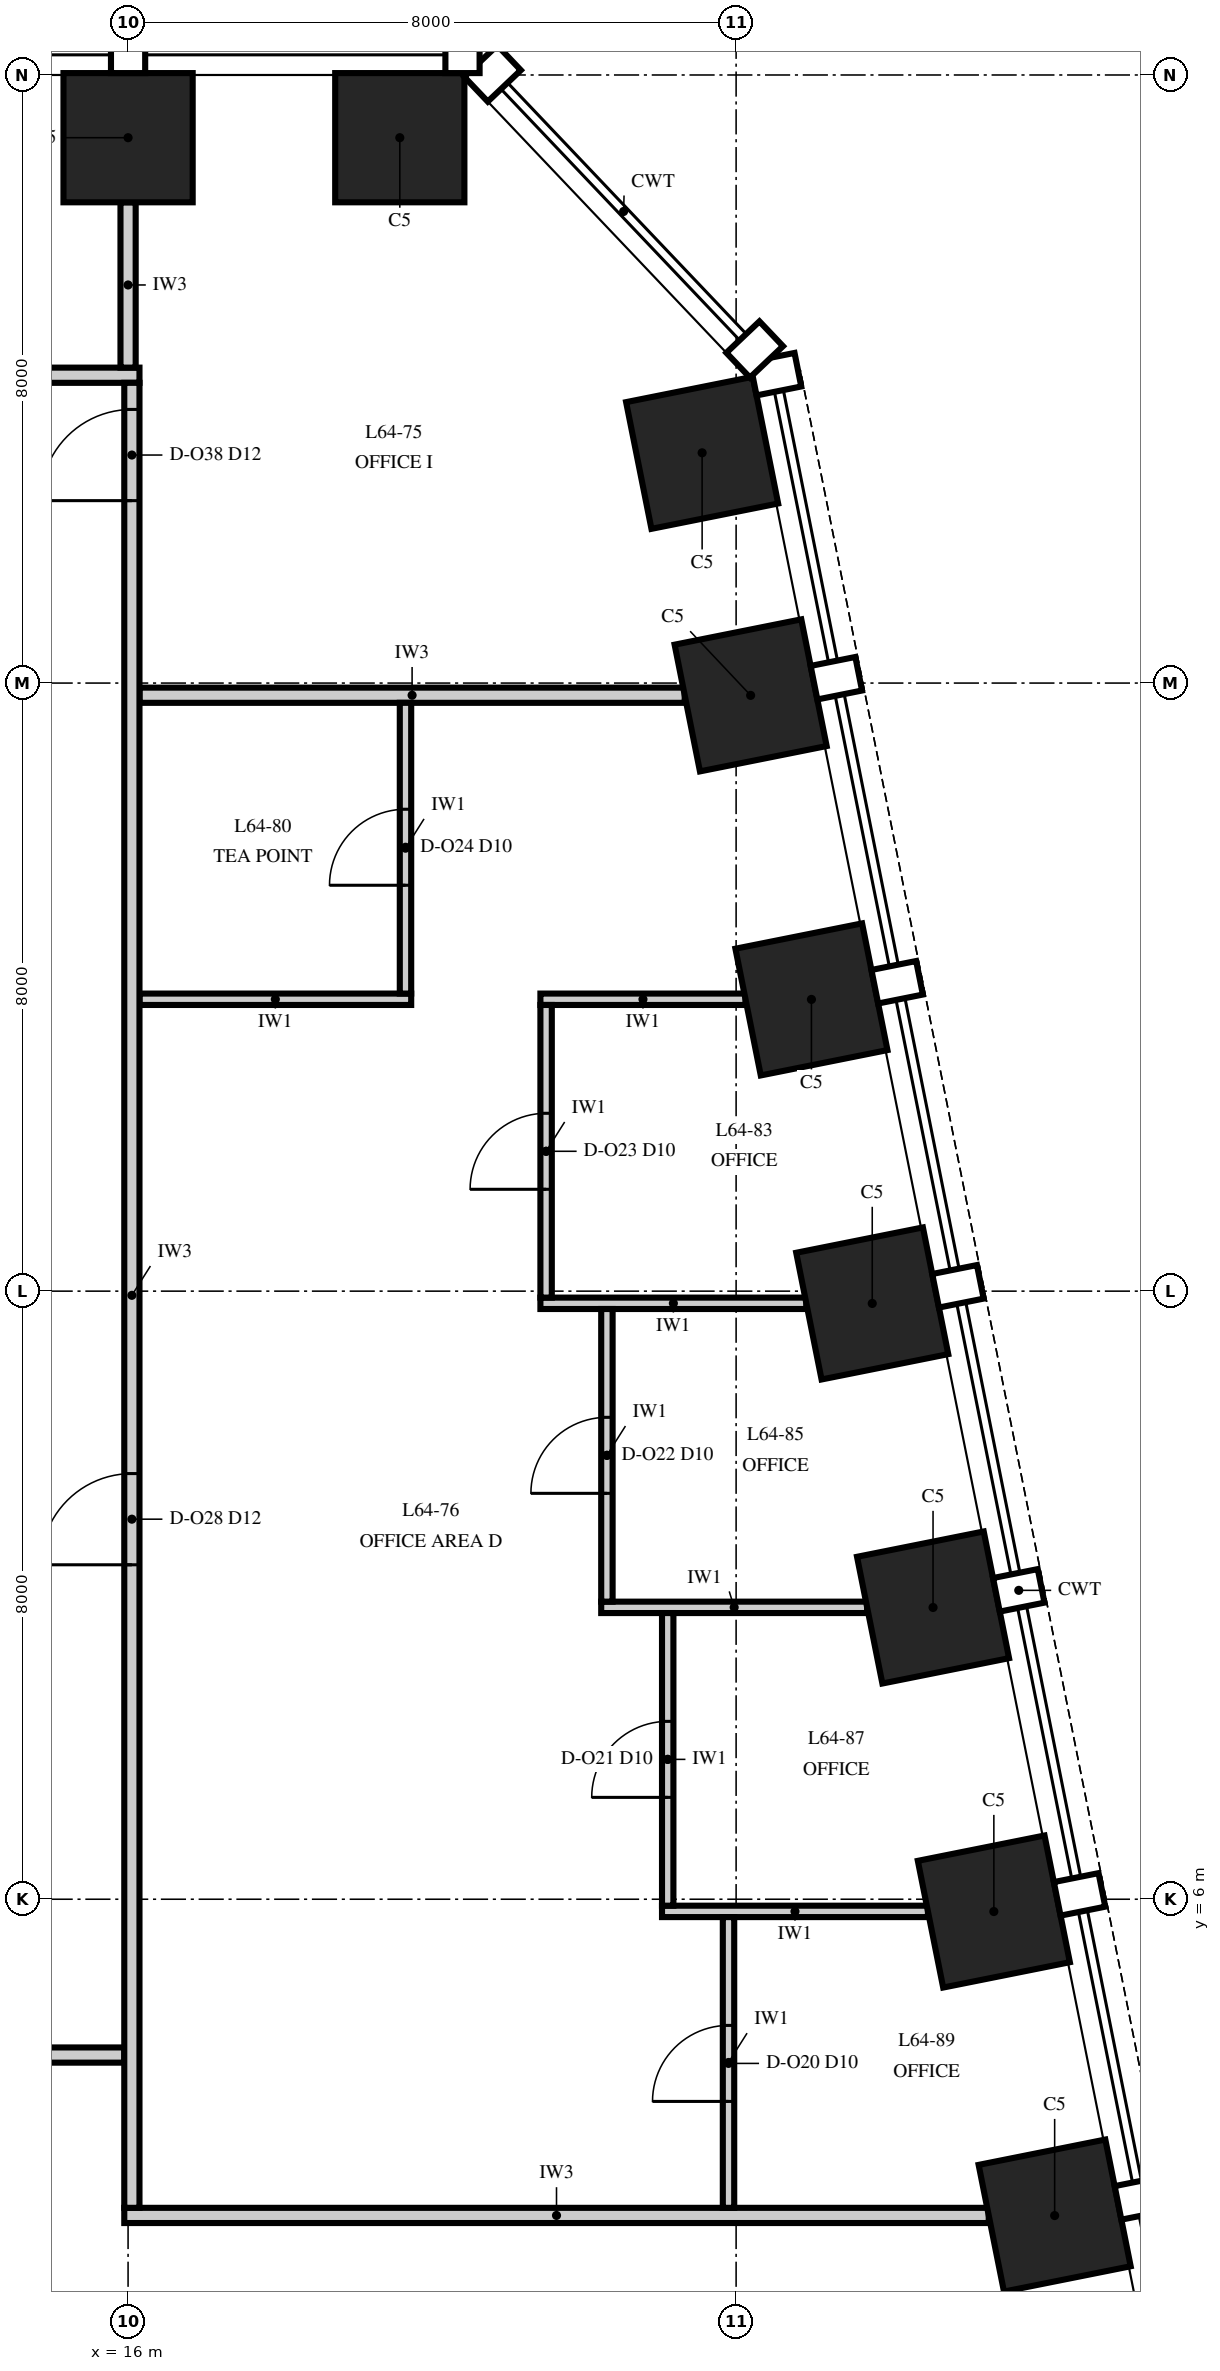
"""IFC4 building model, lengths in metres.
Left out: names, types, materials, properties, quantities, classifications, styles, units other than length and angle.
Written with IfcOpenShell. Run it as: python <this file> out.ifc"""

import sys

from ifc_helpers import new_model, si_unit, direction, frame, frame_2d, origin, origin_2d, place, context, subcontext, project, spatial, rectangle, extrude, element, fill, save


model = new_model("IFC4")
c1 = context("Model", 3, precision=1e-05, world=origin(), true_north=direction((0.0, 1.0)))
c2 = subcontext(c1, "Body", "Model", "MODEL_VIEW")
j1 = project(units=[si_unit("LENGTHUNIT", "METRE"), si_unit("PLANEANGLEUNIT", "RADIAN")], contexts=[c1])
p1 = place(None, origin())
s1 = spatial("IfcSite", under=j1, at=p1, CompositionType="ELEMENT")
p2 = place(p1, origin())
s2 = spatial("IfcBuilding", under=s1, at=p2, CompositionType="ELEMENT")
p3 = place(p2, frame((0.0, 0.0, 276.0)))
s3 = spatial("IfcBuildingStorey", under=s2, at=p3, CompositionType="ELEMENT", Elevation=276.0)
for number, where, z_axis, x_axis in (
    (1, (28.191, 1.838, 0.0), (0.0, 0.0, 1.0), (-0.196, 0.981, 0.0)),
    (2, (27.391, 5.838, 0.0), (0.0, 0.0, 1.0), (-0.196, 0.981, 0.0)),
    (3, (26.591, 9.838, 0.0), (0.0, 0.0, 1.0), (-0.196, 0.981, 0.0)),
    (4, (25.791, 13.838, 0.0), (0.0, 0.0, 1.0), (-0.196, 0.981, 0.0)),
    (5, (24.991, 17.838, 0.0), (0.0, 0.0, 1.0), (-0.196, 0.981, 0.0)),
    (6, (24.191, 21.838, 0.0), (0.0, 0.0, 1.0), (-0.196, 0.981, 0.0)),
    (7, (23.553, 25.029, 0.0), (0.0, 0.0, 1.0), (-0.196, 0.981, 0.0)),
    (8, (19.575, 29.175, 0.0), (0.0, 0.0, 1.0), (-1.0, 0.0, 0.0)),
    (9, (16.0, 29.175, 0.0), (0.0, 0.0, 1.0), (-1.0, 0.0, 0.0)),
):
    element("IfcColumn", number, at=place(p3, frame(where, z_axis=z_axis, x_axis=x_axis)), inside=s3, PredefinedType="COLUMN", context=c2, shape_type="SweptSolid", body=[
        extrude(rectangle(XDim=1.7, YDim=1.7, at=origin_2d()), origin(), (0.0, 0.0, 1.0), 4.0),
    ])
p4 = place(p3, frame((15.95, 1.84, 0.0), z_axis=(0.0, 0.0, 1.0), x_axis=(1.0, 0.0, 0.0)))
e10 = element("IfcWall", 10, at=p4, inside=s3, PredefinedType="PARTITIONING", context=c2, shape_type="SweptSolid", body=[
    extrude(rectangle(XDim=11.374, YDim=0.2, at=frame_2d((5.687, 0.0))), origin(), (0.0, 0.0, 1.0), 3.23),
])
p5 = place(p3, frame((-15.95, 3.95, 0.0), z_axis=(0.0, 0.0, 1.0), x_axis=(1.0, 0.0, 0.0)))
e11 = element("IfcWall", 11, at=p5, inside=s3, PredefinedType="PARTITIONING", context=c2, shape_type="SweptSolid", body=[
    extrude(rectangle(XDim=31.9, YDim=0.2, at=frame_2d((15.95, 0.0))), origin(), (0.0, 0.0, 1.0), 3.23),
])
p6 = place(p5, frame((7.35, 0.0, 0.0)))
e12 = element("IfcOpeningElement", 12, at=p6, cuts=e11, PredefinedType="OPENING", context=c2, shape_type="SweptSolid", body=[
    extrude(rectangle(XDim=1.2, YDim=2.4, at=frame_2d((0.6, 1.2))), frame((0.0, 0.115, 0.0), z_axis=(0.0, -1.0, 0.0), x_axis=(1.0, 0.0, 0.0)), (0.0, 0.0, 1.0), 0.23),
])
p7 = place(p5, frame((23.35, 0.0, 0.0)))
e13 = element("IfcOpeningElement", 13, at=p7, cuts=e11, PredefinedType="OPENING", context=c2, shape_type="SweptSolid", body=[
    extrude(rectangle(XDim=1.2, YDim=2.4, at=frame_2d((0.6, 1.2))), frame((0.0, 0.115, 0.0), z_axis=(0.0, -1.0, 0.0), x_axis=(1.0, 0.0, 0.0)), (0.0, 0.0, 1.0), 0.23),
])
p8 = place(p3, frame((23.025, 5.84, 0.0), z_axis=(0.0, 0.0, 1.0), x_axis=(1.0, 0.0, 0.0)))
e14 = element("IfcWall", 14, at=p8, inside=s3, PredefinedType="PARTITIONING", context=c2, shape_type="SweptSolid", body=[
    extrude(rectangle(XDim=3.499, YDim=0.15, at=frame_2d((1.75, 0.0))), origin(), (0.0, 0.0, 1.0), 2.842),
])
for number, where, z_axis, x_axis in (
    (15, (22.225, 9.84, 0.0), (0.0, 0.0, 1.0), (1.0, 0.0, 0.0)),
    (16, (21.425, 13.84, 0.0), (0.0, 0.0, 1.0), (1.0, 0.0, 0.0)),
):
    element("IfcWall", number, at=place(p3, frame(where, z_axis=z_axis, x_axis=x_axis)), inside=s3, PredefinedType="PARTITIONING", context=c2, shape_type="SweptSolid", body=[
        extrude(rectangle(XDim=3.499, YDim=0.15, at=frame_2d((1.75, 0.0))), origin(), (0.0, 0.0, 1.0), 3.23),
    ])
p9 = place(p3, frame((16.15, 17.84, 0.0), z_axis=(0.0, 0.0, 1.0), x_axis=(1.0, 0.0, 0.0)))
e17 = element("IfcWall", 17, at=p9, inside=s3, PredefinedType="PARTITIONING", context=c2, shape_type="SweptSolid", body=[
    extrude(rectangle(XDim=3.575, YDim=0.15, at=frame_2d((1.788, 0.0))), origin(), (0.0, 0.0, 1.0), 3.23),
])
p10 = place(p3, frame((21.425, 17.84, 0.0), z_axis=(0.0, 0.0, 1.0), x_axis=(1.0, 0.0, 0.0)))
e18 = element("IfcWall", 18, at=p10, inside=s3, PredefinedType="PARTITIONING", context=c2, shape_type="SweptSolid", body=[
    extrude(rectangle(XDim=2.699, YDim=0.15, at=frame_2d((1.349, 0.0))), origin(), (0.0, 0.0, 1.0), 3.23),
])
p11 = place(p3, frame((16.15, 21.84, 0.0), z_axis=(0.0, 0.0, 1.0), x_axis=(1.0, 0.0, 0.0)))
e19 = element("IfcWall", 19, at=p11, inside=s3, PredefinedType="PARTITIONING", context=c2, shape_type="SweptSolid", body=[
    extrude(rectangle(XDim=7.174, YDim=0.2, at=frame_2d((3.587, 0.0))), origin(), (0.0, 0.0, 1.0), 3.23),
])
p12 = place(p3, frame((-16.15, 26.05, 0.0), z_axis=(0.0, 0.0, 1.0), x_axis=(1.0, 0.0, 0.0)))
e20 = element("IfcWall", 20, at=p12, inside=s3, PredefinedType="PARTITIONING", context=c2, shape_type="SweptSolid", body=[
    extrude(rectangle(XDim=32.3, YDim=0.2, at=frame_2d((16.15, 0.0))), origin(), (0.0, 0.0, 1.0), 3.418),
])
p13 = place(p12, frame((1.55, 0.0, 0.0)))
e21 = element("IfcOpeningElement", 21, at=p13, cuts=e20, PredefinedType="OPENING", context=c2, shape_type="SweptSolid", body=[
    extrude(rectangle(XDim=1.2, YDim=2.4, at=frame_2d((0.6, 1.2))), frame((0.0, 0.115, 0.0), z_axis=(0.0, -1.0, 0.0), x_axis=(1.0, 0.0, 0.0)), (0.0, 0.0, 1.0), 0.23),
])
p14 = place(p12, frame((5.55, 0.0, 0.0)))
e22 = element("IfcOpeningElement", 22, at=p14, cuts=e20, PredefinedType="OPENING", context=c2, shape_type="SweptSolid", body=[
    extrude(rectangle(XDim=1.2, YDim=2.4, at=frame_2d((0.6, 1.2))), frame((0.0, 0.115, 0.0), z_axis=(0.0, -1.0, 0.0), x_axis=(1.0, 0.0, 0.0)), (0.0, 0.0, 1.0), 0.23),
])
p15 = place(p12, frame((9.55, 0.0, 0.0)))
e23 = element("IfcOpeningElement", 23, at=p15, cuts=e20, PredefinedType="OPENING", context=c2, shape_type="SweptSolid", body=[
    extrude(rectangle(XDim=1.2, YDim=2.4, at=frame_2d((0.6, 1.2))), frame((0.0, 0.115, 0.0), z_axis=(0.0, -1.0, 0.0), x_axis=(1.0, 0.0, 0.0)), (0.0, 0.0, 1.0), 0.23),
])
p16 = place(p12, frame((13.55, 0.0, 0.0)))
e24 = element("IfcOpeningElement", 24, at=p16, cuts=e20, PredefinedType="OPENING", context=c2, shape_type="SweptSolid", body=[
    extrude(rectangle(XDim=1.2, YDim=2.4, at=frame_2d((0.6, 1.2))), frame((0.0, 0.115, 0.0), z_axis=(0.0, -1.0, 0.0), x_axis=(1.0, 0.0, 0.0)), (0.0, 0.0, 1.0), 0.23),
])
p17 = place(p12, frame((17.55, 0.0, 0.0)))
e25 = element("IfcOpeningElement", 25, at=p17, cuts=e20, PredefinedType="OPENING", context=c2, shape_type="SweptSolid", body=[
    extrude(rectangle(XDim=1.2, YDim=2.4, at=frame_2d((0.6, 1.2))), frame((0.0, 0.115, 0.0), z_axis=(0.0, -1.0, 0.0), x_axis=(1.0, 0.0, 0.0)), (0.0, 0.0, 1.0), 0.23),
])
p18 = place(p12, frame((21.55, 0.0, 0.0)))
e26 = element("IfcOpeningElement", 26, at=p18, cuts=e20, PredefinedType="OPENING", context=c2, shape_type="SweptSolid", body=[
    extrude(rectangle(XDim=1.2, YDim=2.4, at=frame_2d((0.6, 1.2))), frame((0.0, 0.115, 0.0), z_axis=(0.0, -1.0, 0.0), x_axis=(1.0, 0.0, 0.0)), (0.0, 0.0, 1.0), 0.23),
])
p19 = place(p12, frame((25.55, 0.0, 0.0)))
e27 = element("IfcOpeningElement", 27, at=p19, cuts=e20, PredefinedType="OPENING", context=c2, shape_type="SweptSolid", body=[
    extrude(rectangle(XDim=1.2, YDim=2.4, at=frame_2d((0.6, 1.2))), frame((0.0, 0.115, 0.0), z_axis=(0.0, -1.0, 0.0), x_axis=(1.0, 0.0, 0.0)), (0.0, 0.0, 1.0), 0.23),
])
p20 = place(p12, frame((29.55, 0.0, 0.0)))
e28 = element("IfcOpeningElement", 28, at=p20, cuts=e20, PredefinedType="OPENING", context=c2, shape_type="SweptSolid", body=[
    extrude(rectangle(XDim=1.2, YDim=2.4, at=frame_2d((0.6, 1.2))), frame((0.0, 0.115, 0.0), z_axis=(0.0, -1.0, 0.0), x_axis=(1.0, 0.0, 0.0)), (0.0, 0.0, 1.0), 0.23),
])
p21 = place(p3, frame((16.0, 26.15, 0.0), z_axis=(0.0, 0.0, 1.0), x_axis=(0.0, 1.0, 0.0)))
e29 = element("IfcWall", 29, at=p21, inside=s3, PredefinedType="PARTITIONING", context=c2, shape_type="SweptSolid", body=[
    extrude(rectangle(XDim=2.175, YDim=0.2, at=frame_2d((1.087, 0.0))), origin(), (0.0, 0.0, 1.0), 3.418),
])
p22 = place(p3, frame((16.05, 1.94, 0.0), z_axis=(0.0, 0.0, 1.0), x_axis=(0.0, 1.0, 0.0)))
e30 = element("IfcWall", 30, at=p22, inside=s3, PredefinedType="PARTITIONING", context=c2, shape_type="SweptSolid", body=[
    extrude(rectangle(XDim=24.01, YDim=0.2, at=frame_2d((12.005, 0.0))), origin(), (0.0, 0.0, 1.0), 2.842),
])
p23 = place(p22, frame((8.46, 0.0, 0.0)))
e31 = element("IfcOpeningElement", 31, at=p23, cuts=e30, PredefinedType="OPENING", context=c2, shape_type="SweptSolid", body=[
    extrude(rectangle(XDim=1.2, YDim=2.4, at=frame_2d((0.6, 1.2))), frame((0.0, 0.115, 0.0), z_axis=(0.0, -1.0, 0.0), x_axis=(1.0, 0.0, 0.0)), (0.0, 0.0, 1.0), 0.23),
])
p24 = place(p22, frame((22.46, 0.0, 0.0)))
e32 = element("IfcOpeningElement", 32, at=p24, cuts=e30, PredefinedType="OPENING", context=c2, shape_type="SweptSolid", body=[
    extrude(rectangle(XDim=1.2, YDim=2.4, at=frame_2d((0.6, 1.2))), frame((0.0, 0.115, 0.0), z_axis=(0.0, -1.0, 0.0), x_axis=(1.0, 0.0, 0.0)), (0.0, 0.0, 1.0), 0.23),
])
p25 = place(p3, frame((19.65, 17.915, 0.0), z_axis=(0.0, 0.0, 1.0), x_axis=(0.0, 1.0, 0.0)))
e33 = element("IfcWall", 33, at=p25, inside=s3, PredefinedType="PARTITIONING", context=c2, shape_type="SweptSolid", body=[
    extrude(rectangle(XDim=3.825, YDim=0.15, at=frame_2d((1.913, 0.0))), origin(), (0.0, 0.0, 1.0), 3.23),
])
p26 = place(p25, frame((1.425, 0.0, 0.0)))
e34 = element("IfcOpeningElement", 34, at=p26, cuts=e33, PredefinedType="OPENING", context=c2, shape_type="SweptSolid", body=[
    extrude(rectangle(XDim=1.0, YDim=2.3, at=frame_2d((0.5, 1.15))), frame((0.0, 0.09, 0.0), z_axis=(0.0, -1.0, 0.0), x_axis=(1.0, 0.0, 0.0)), (0.0, 0.0, 1.0), 0.18),
])
p27 = place(p3, frame((21.5, 13.915, 0.0), z_axis=(0.0, 0.0, 1.0), x_axis=(0.0, 1.0, 0.0)))
e35 = element("IfcWall", 35, at=p27, inside=s3, PredefinedType="PARTITIONING", context=c2, shape_type="SweptSolid", body=[
    extrude(rectangle(XDim=3.85, YDim=0.15, at=frame_2d((1.925, 0.0))), origin(), (0.0, 0.0, 1.0), 3.23),
])
p28 = place(p27, frame((1.425, 0.0, 0.0)))
e36 = element("IfcOpeningElement", 36, at=p28, cuts=e35, PredefinedType="OPENING", context=c2, shape_type="SweptSolid", body=[
    extrude(rectangle(XDim=1.0, YDim=2.3, at=frame_2d((0.5, 1.15))), frame((0.0, 0.09, 0.0), z_axis=(0.0, -1.0, 0.0), x_axis=(1.0, 0.0, 0.0)), (0.0, 0.0, 1.0), 0.18),
])
p29 = place(p3, frame((22.3, 9.915, 0.0), z_axis=(0.0, 0.0, 1.0), x_axis=(0.0, 1.0, 0.0)))
e37 = element("IfcWall", 37, at=p29, inside=s3, PredefinedType="PARTITIONING", context=c2, shape_type="SweptSolid", body=[
    extrude(rectangle(XDim=3.85, YDim=0.15, at=frame_2d((1.925, 0.0))), origin(), (0.0, 0.0, 1.0), 3.85),
])
p30 = place(p29, frame((1.425, 0.0, 0.0)))
e38 = element("IfcOpeningElement", 38, at=p30, cuts=e37, PredefinedType="OPENING", context=c2, shape_type="SweptSolid", body=[
    extrude(rectangle(XDim=1.0, YDim=2.3, at=frame_2d((0.5, 1.15))), frame((0.0, 0.09, 0.0), z_axis=(0.0, -1.0, 0.0), x_axis=(1.0, 0.0, 0.0)), (0.0, 0.0, 1.0), 0.18),
])
p31 = place(p3, frame((23.1, 5.915, 0.0), z_axis=(0.0, 0.0, 1.0), x_axis=(0.0, 1.0, 0.0)))
e39 = element("IfcWall", 39, at=p31, inside=s3, PredefinedType="PARTITIONING", context=c2, shape_type="SweptSolid", body=[
    extrude(rectangle(XDim=3.85, YDim=0.15, at=frame_2d((1.925, 0.0))), origin(), (0.0, 0.0, 1.0), 2.842),
])
p32 = place(p31, frame((1.425, 0.0, 0.0)))
e40 = element("IfcOpeningElement", 40, at=p32, cuts=e39, PredefinedType="OPENING", context=c2, shape_type="SweptSolid", body=[
    extrude(rectangle(XDim=1.0, YDim=2.3, at=frame_2d((0.5, 1.15))), frame((0.0, 0.09, 0.0), z_axis=(0.0, -1.0, 0.0), x_axis=(1.0, 0.0, 0.0)), (0.0, 0.0, 1.0), 0.18),
])
p33 = place(p3, frame((23.9, 1.94, 0.0), z_axis=(0.0, 0.0, 1.0), x_axis=(0.0, 1.0, 0.0)))
e41 = element("IfcWall", 41, at=p33, inside=s3, PredefinedType="PARTITIONING", context=c2, shape_type="SweptSolid", body=[
    extrude(rectangle(XDim=3.825, YDim=0.15, at=frame_2d((1.913, 0.0))), origin(), (0.0, 0.0, 1.0), 3.85),
])
p34 = place(p33, frame((1.4, 0.0, 0.0)))
e42 = element("IfcOpeningElement", 42, at=p34, cuts=e41, PredefinedType="OPENING", context=c2, shape_type="SweptSolid", body=[
    extrude(rectangle(XDim=1.0, YDim=2.3, at=frame_2d((0.5, 1.15))), frame((0.0, 0.09, 0.0), z_axis=(0.0, -1.0, 0.0), x_axis=(1.0, 0.0, 0.0)), (0.0, 0.0, 1.0), 0.18),
])
p35 = place(p34, origin())
e43 = element("IfcDoor", 43, at=p35, inside=s3, OperationType="SINGLE_SWING_LEFT", PredefinedType="DOOR", context=c2, shape_type="SweptSolid", body=[
    extrude(rectangle(XDim=1.0, YDim=2.3, at=frame_2d((0.5, 1.15))), frame((0.0, 0.075, 0.0), z_axis=(0.0, -1.0, 0.0), x_axis=(1.0, 0.0, 0.0)), (0.0, 0.0, 1.0), 0.149),
])
fill(e42, e43)
p36 = place(p32, origin())
e44 = element("IfcDoor", 44, at=p36, inside=s3, OperationType="SINGLE_SWING_LEFT", PredefinedType="DOOR", context=c2, shape_type="SweptSolid", body=[
    extrude(rectangle(XDim=1.0, YDim=2.3, at=frame_2d((0.5, 1.15))), frame((0.0, 0.075, 0.0), z_axis=(0.0, -1.0, 0.0), x_axis=(1.0, 0.0, 0.0)), (0.0, 0.0, 1.0), 0.149),
])
fill(e40, e44)
p37 = place(p30, origin())
e45 = element("IfcDoor", 45, at=p37, inside=s3, OperationType="SINGLE_SWING_LEFT", PredefinedType="DOOR", context=c2, shape_type="SweptSolid", body=[
    extrude(rectangle(XDim=1.0, YDim=2.3, at=frame_2d((0.5, 1.15))), frame((0.0, 0.075, 0.0), z_axis=(0.0, -1.0, 0.0), x_axis=(1.0, 0.0, 0.0)), (0.0, 0.0, 1.0), 0.149),
])
fill(e38, e45)
p38 = place(p28, origin())
e46 = element("IfcDoor", 46, at=p38, inside=s3, OperationType="SINGLE_SWING_LEFT", PredefinedType="DOOR", context=c2, shape_type="SweptSolid", body=[
    extrude(rectangle(XDim=1.0, YDim=2.3, at=frame_2d((0.5, 1.15))), frame((0.0, 0.075, 0.0), z_axis=(0.0, -1.0, 0.0), x_axis=(1.0, 0.0, 0.0)), (0.0, 0.0, 1.0), 0.149),
])
fill(e36, e46)
p39 = place(p26, origin())
e47 = element("IfcDoor", 47, at=p39, inside=s3, OperationType="SINGLE_SWING_LEFT", PredefinedType="DOOR", context=c2, shape_type="SweptSolid", body=[
    extrude(rectangle(XDim=1.0, YDim=2.3, at=frame_2d((0.5, 1.15))), frame((0.0, 0.075, 0.0), z_axis=(0.0, -1.0, 0.0), x_axis=(1.0, 0.0, 0.0)), (0.0, 0.0, 1.0), 0.149),
])
fill(e34, e47)
p40 = place(p23, origin())
e48 = element("IfcDoor", 48, at=p40, inside=s3, OperationType="SINGLE_SWING_LEFT", PredefinedType="DOOR", context=c2, shape_type="SweptSolid", body=[
    extrude(rectangle(XDim=1.2, YDim=2.4, at=frame_2d((0.6, 1.2))), frame((0.0, 0.1, 0.0), z_axis=(0.0, -1.0, 0.0), x_axis=(1.0, 0.0, 0.0)), (0.0, 0.0, 1.0), 0.199),
])
fill(e31, e48)
p41 = place(p24, origin())
e49 = element("IfcDoor", 49, at=p41, inside=s3, OperationType="SINGLE_SWING_LEFT", PredefinedType="DOOR", context=c2, shape_type="SweptSolid", body=[
    extrude(rectangle(XDim=1.2, YDim=2.4, at=frame_2d((0.6, 1.2))), frame((0.0, 0.1, 0.0), z_axis=(0.0, -1.0, 0.0), x_axis=(1.0, 0.0, 0.0)), (0.0, 0.0, 1.0), 0.199),
])
fill(e32, e49)
save(model, sys.argv[1])
